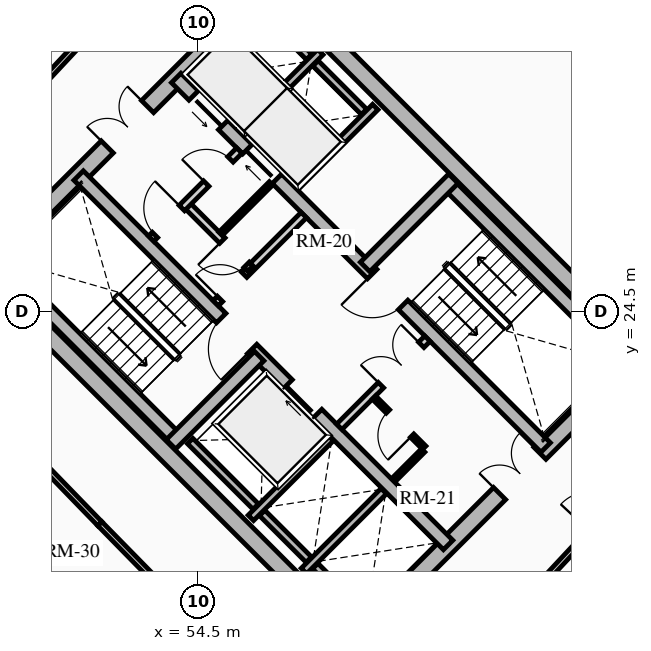
"""IFC4 building model, lengths in metres.
Left out: names, types, materials, properties, quantities, classifications, styles, units other than length and angle.
Written with IfcOpenShell. Run it as: python <this file> out.ifc"""

import sys

from ifc_helpers import new_model, si_unit, direction, frame, frame_2d, origin, place, context, subcontext, project, spatial, rectangle, extrude, source, transform, mapped, element, fill, save


model = new_model("IFC4")
c1 = context("Model", 3, precision=1e-05, world=origin(), true_north=direction((0.0, 1.0)))
c2 = subcontext(c1, "Body", "Model", "MODEL_VIEW")
j1 = project(units=[si_unit("LENGTHUNIT", "METRE"), si_unit("PLANEANGLEUNIT", "RADIAN")], contexts=[c1])
p1 = place(None, origin())
s1 = spatial("IfcSite", under=j1, at=p1, CompositionType="ELEMENT")
p2 = place(p1, origin())
s2 = spatial("IfcBuilding", under=s1, at=p2, CompositionType="ELEMENT")
p3 = place(p2, frame((0.0, 0.0, 107.98)))
s3 = spatial("IfcBuildingStorey", under=s2, at=p3, CompositionType="ELEMENT", Elevation=107.98)
for number, where, z_axis, x_axis in (
    (1, (58.737, 15.697, 0.0), (0.0, 0.0, 1.0), (-0.707, 0.707, 0.0)),
    (2, (66.303, 23.263, 0.0), (0.0, 0.0, 1.0), (-0.707, 0.707, 0.0)),
):
    element("IfcWall", number, at=place(p3, frame(where, z_axis=z_axis, x_axis=x_axis)), inside=s3, PredefinedType="SHEAR", context=c2, shape_type="SweptSolid", body=[
        extrude(rectangle(XDim=14.2, YDim=0.45, at=frame_2d((7.1, 0.0))), origin(), (0.0, 0.0, 1.0), 2.91),
    ])
p4 = place(p3, frame((58.578, 15.856, 0.0), z_axis=(0.0, 0.0, 1.0), x_axis=(0.707106781187, 0.707106781187, 0.0)))
e3 = element("IfcWall", 3, at=p4, inside=s3, PredefinedType="SHEAR", context=c2, shape_type="SweptSolid", body=[
    extrude(rectangle(XDim=10.7, YDim=0.45, at=frame_2d((5.35, 0.0))), origin(), (0.0, 0.0, 1.0), 2.91),
])
m1 = source(origin(), c2, "Body", "SweptSolid", [
    extrude(rectangle(XDim=1.5, YDim=2.02, at=frame_2d((0.75, 1.01))), frame((0.0, 0.235, 0.0), z_axis=(0.0, -1.0, 0.0), x_axis=(1.0, 0.0, 0.0)), (0.0, 0.0, 1.0), 0.47),
])
p5 = place(p4, frame((5.45, 0.0, 0.0)))
e4 = element("IfcOpeningElement", 4, at=p5, cuts=e3, PredefinedType="OPENING", context=c2, shape_type="MappedRepresentation", body=[
    mapped(m1, transform((0.0, 0.0, 0.0), x_axis=(1.0, 0.0, 0.0), y_axis=(0.0, 1.0, 0.0), z_axis=(0.0, 0.0, 1.0), scale=1.0)),
])
p6 = place(p3, frame((48.856, 25.578, 0.0), z_axis=(0.0, 0.0, 1.0), x_axis=(0.707106781187, 0.707106781187, 0.0)))
e5 = element("IfcWall", 5, at=p6, inside=s3, PredefinedType="SHEAR", context=c2, shape_type="SweptSolid", body=[
    extrude(rectangle(XDim=10.7, YDim=0.45, at=frame_2d((5.35, 0.0))), origin(), (0.0, 0.0, 1.0), 2.91),
])
p7 = place(p6, frame((4.6, 0.0, 0.0)))
e6 = element("IfcOpeningElement", 6, at=p7, cuts=e5, PredefinedType="OPENING", context=c2, shape_type="MappedRepresentation", body=[
    mapped(m1, transform((0.0, 0.0, 0.0), x_axis=(1.0, 0.0, 0.0), y_axis=(0.0, 1.0, 0.0), z_axis=(0.0, 0.0, 1.0), scale=1.0)),
])
p8 = place(p3, frame((61.078, 18.355, 0.0), z_axis=(0.0, 0.0, 1.0), x_axis=(-0.707106781187, 0.707106781187, 0.0)))
e7 = element("IfcWall", 7, at=p8, inside=s3, PredefinedType="SHEAR", context=c2, shape_type="SweptSolid", body=[
    extrude(rectangle(XDim=13.75, YDim=0.35, at=frame_2d((6.875, 0.0))), origin(), (0.0, 0.0, 1.0), 2.91),
])
m2 = source(origin(), c2, "Body", "SweptSolid", [
    extrude(rectangle(XDim=1.1, YDim=2.015, at=frame_2d((0.55, 1.007))), frame((0.0, 0.185, 0.0), z_axis=(0.0, -1.0, 0.0), x_axis=(1.0, 0.0, 0.0)), (0.0, 0.0, 1.0), 0.37),
])
p9 = place(p8, frame((4.875, 0.0, 0.0)))
e8 = element("IfcOpeningElement", 8, at=p9, cuts=e7, PredefinedType="OPENING", context=c2, shape_type="MappedRepresentation", body=[
    mapped(m2, transform((0.0, 0.0, 0.0), x_axis=(1.0, 0.0, 0.0), y_axis=(0.0, 1.0, 0.0), z_axis=(0.0, 0.0, 1.0), scale=1.0)),
])
m3 = source(origin(), c2, "Body", "SweptSolid", [
    extrude(rectangle(XDim=1.15, YDim=2.02, at=frame_2d((0.575, 1.01))), frame((0.0, 0.185, 0.0), z_axis=(0.0, -1.0, 0.0), x_axis=(1.0, 0.0, 0.0)), (0.0, 0.0, 1.0), 0.37),
])
p10 = place(p8, frame((7.295, 0.0, 0.0)))
e9 = element("IfcOpeningElement", 9, at=p10, cuts=e7, PredefinedType="OPENING", context=c2, shape_type="MappedRepresentation", body=[
    mapped(m3, transform((0.0, 0.0, 0.0), x_axis=(1.0, 0.0, 0.0), y_axis=(0.0, 1.0, 0.0), z_axis=(0.0, 0.0, 1.0), scale=1.0)),
])
p11 = place(p3, frame((63.645, 20.922, 0.0), z_axis=(0.0, 0.0, 1.0), x_axis=(-0.707106781187, 0.707106781187, 0.0)))
e10 = element("IfcWall", 10, at=p11, inside=s3, PredefinedType="SHEAR", context=c2, shape_type="SweptSolid", body=[
    extrude(rectangle(XDim=13.75, YDim=0.35, at=frame_2d((6.875, 0.0))), origin(), (0.0, 0.0, 1.0), 2.91),
])
p12 = place(p11, frame((10.0, 0.0, 0.0)))
e11 = element("IfcOpeningElement", 11, at=p12, cuts=e10, PredefinedType="OPENING", context=c2, shape_type="MappedRepresentation", body=[
    mapped(m2, transform((0.0, 0.0, 0.0), x_axis=(1.0, 0.0, 0.0), y_axis=(0.0, 1.0, 0.0), z_axis=(0.0, 0.0, 1.0), scale=1.0)),
])
p13 = place(p11, frame((12.0, 0.0, 0.0)))
e12 = element("IfcOpeningElement", 12, at=p13, cuts=e10, PredefinedType="OPENING", context=c2, shape_type="MappedRepresentation", body=[
    mapped(m2, transform((0.0, 0.0, 0.0), x_axis=(1.0, 0.0, 0.0), y_axis=(0.0, 1.0, 0.0), z_axis=(0.0, 0.0, 1.0), scale=1.0)),
])
p14 = place(p11, frame((5.305, 0.0, 0.0)))
e13 = element("IfcOpeningElement", 13, at=p14, cuts=e10, PredefinedType="OPENING", context=c2, shape_type="MappedRepresentation", body=[
    mapped(m3, transform((0.0, 0.0, 0.0), x_axis=(1.0, 0.0, 0.0), y_axis=(0.0, 1.0, 0.0), z_axis=(0.0, 0.0, 1.0), scale=1.0)),
])
p15 = place(p3, frame((53.922, 21.141, 0.0), z_axis=(0.0, 0.0, 1.0), x_axis=(-0.707088616009, 0.707124945897, 0.0)))
e14 = element("IfcWall", 14, at=p15, inside=s3, PredefinedType="SHEAR", context=c2, shape_type="SweptSolid", body=[
    extrude(rectangle(XDim=6.72, YDim=0.35, at=frame_2d((3.36, 0.0))), origin(), (0.0, 0.0, 1.0), 2.91),
])
p16 = place(p3, frame((53.784, 21.003, 0.0), z_axis=(0.0, 0.0, 1.0), x_axis=(0.707106781187, 0.707106781187, 0.0)))
e15 = element("IfcWall", 15, at=p16, inside=s3, PredefinedType="SHEAR", context=c2, shape_type="SweptSolid", body=[
    extrude(rectangle(XDim=3.285, YDim=0.35, at=frame_2d((1.643, 0.0))), origin(), (0.0, 0.0, 1.0), 2.91),
])
p17 = place(p3, frame((65.83, 23.107, 0.0), z_axis=(0.0, 0.0, 1.0), x_axis=(-0.707088616009, 0.707124945897, 0.0)))
e16 = element("IfcWall", 16, at=p17, inside=s3, PredefinedType="SHEAR", context=c2, shape_type="SweptSolid", body=[
    extrude(rectangle(XDim=6.72, YDim=0.35, at=frame_2d((3.36, 0.0))), origin(), (0.0, 0.0, 1.0), 2.91),
])
p18 = place(p3, frame((58.893, 25.674, 0.0), z_axis=(0.0, 0.0, 1.0), x_axis=(0.707106781187, 0.707106781187, 0.0)))
e17 = element("IfcWall", 17, at=p18, inside=s3, PredefinedType="SHEAR", context=c2, shape_type="SweptSolid", body=[
    extrude(rectangle(XDim=3.285, YDim=0.35, at=frame_2d((1.643, 0.0))), origin(), (0.0, 0.0, 1.0), 2.91),
])
p19 = place(p3, frame((55.888, 19.069, 0.0), z_axis=(0.0, 0.0, 1.0), x_axis=(0.707106781187, 0.707106781187, 0.0)))
e18 = element("IfcWall", 18, at=p19, inside=s3, PredefinedType="SHEAR", context=c2, shape_type="SweptSolid", body=[
    extrude(rectangle(XDim=2.97, YDim=0.2, at=frame_2d((1.485, 0.0))), origin(), (0.0, 0.0, 1.0), 2.91),
])
p20 = place(p3, frame((56.015, 19.366, 0.0), z_axis=(0.0, 0.0, 1.0), x_axis=(-0.707106781187, 0.707106781187, 0.0)))
e19 = element("IfcWall", 19, at=p20, inside=s3, PredefinedType="SHEAR", context=c2, shape_type="SweptSolid", body=[
    extrude(rectangle(XDim=2.44, YDim=0.2, at=frame_2d((1.22, 0.0))), origin(), (0.0, 0.0, 1.0), 2.91),
])
p21 = place(p3, frame((57.284, 17.673, 0.0), z_axis=(0.0, 0.0, 1.0), x_axis=(0.707147878904, 0.70706568108, 0.0)))
e20 = element("IfcWall", 20, at=p21, inside=s3, PredefinedType="SHEAR", context=c2, shape_type="SweptSolid", body=[
    extrude(rectangle(XDim=2.97, YDim=0.2, at=frame_2d((1.485, 0.0))), origin(), (0.0, 0.0, 1.0), 2.91),
])
p22 = place(p3, frame((57.412, 17.97, 0.0), z_axis=(0.0, 0.0, 1.0), x_axis=(-0.707106781187, 0.707106781187, 0.0)))
e21 = element("IfcWall", 21, at=p22, inside=s3, PredefinedType="SHEAR", context=c2, shape_type="SweptSolid", body=[
    extrude(rectangle(XDim=1.735, YDim=0.2, at=frame_2d((0.867, 0.0))), origin(), (0.0, 0.0, 1.0), 2.91),
])
p23 = place(p3, frame((58.737, 16.644, 0.0), z_axis=(0.0, 0.0, 1.0), x_axis=(-0.707032117043, 0.707181437447, 0.0)))
e22 = element("IfcWall", 22, at=p23, inside=s3, PredefinedType="SHEAR", context=c2, shape_type="SweptSolid", body=[
    extrude(rectangle(XDim=1.635, YDim=0.2, at=frame_2d((0.817, 0.0))), origin(), (0.0, 0.0, 1.0), 2.91),
])
p24 = place(p3, frame((57.062, 27.781, 0.0), z_axis=(0.0, 0.0, 1.0), x_axis=(0.707106781187, 0.707106781187, 0.0)))
e23 = element("IfcWall", 23, at=p24, inside=s3, PredefinedType="SHEAR", context=c2, shape_type="SweptSolid", body=[
    extrude(rectangle(XDim=2.97, YDim=0.2, at=frame_2d((1.485, 0.0))), origin(), (0.0, 0.0, 1.0), 2.91),
])
p25 = place(p3, frame((55.615, 29.227, 0.0), z_axis=(0.0, 0.0, 1.0), x_axis=(0.707147878904, 0.70706568108, 0.0)))
e24 = element("IfcWall", 24, at=p25, inside=s3, PredefinedType="SHEAR", context=c2, shape_type="SweptSolid", body=[
    extrude(rectangle(XDim=2.97, YDim=0.2, at=frame_2d((1.485, 0.0))), origin(), (0.0, 0.0, 1.0), 2.91),
])
p26 = place(p3, frame((58.865, 29.754, 0.0), z_axis=(0.0, 0.0, 1.0), x_axis=(-0.707174411312, 0.707039144592, 0.0)))
e25 = element("IfcWall", 25, at=p26, inside=s3, PredefinedType="SHEAR", context=c2, shape_type="SweptSolid", body=[
    extrude(rectangle(XDim=1.805, YDim=0.2, at=frame_2d((0.902, 0.0))), origin(), (0.0, 0.0, 1.0), 2.91),
])
p27 = place(p3, frame((57.419, 31.2, 0.0), z_axis=(0.0, 0.0, 1.0), x_axis=(-0.707032117043, 0.707181437447, 0.0)))
e26 = element("IfcWall", 26, at=p27, inside=s3, PredefinedType="SHEAR", context=c2, shape_type="SweptSolid", body=[
    extrude(rectangle(XDim=1.635, YDim=0.2, at=frame_2d((0.817, 0.0))), origin(), (0.0, 0.0, 1.0), 2.91),
])
p28 = place(p3, frame((58.214, 21.467, 0.0), z_axis=(0.0, 0.0, 1.0), x_axis=(0.707106781187, 0.707106781187, 0.0)))
e27 = element("IfcWall", 27, at=p28, inside=s3, PredefinedType="PARTITIONING", context=c2, shape_type="SweptSolid", body=[
    extrude(rectangle(XDim=3.28, YDim=0.2, at=frame_2d((1.64, 0.0))), origin(), (0.0, 0.0, 1.0), 2.655),
])
m4 = source(origin(), c2, "Body", "SweptSolid", [
    extrude(rectangle(XDim=1.5, YDim=2.02, at=frame_2d((0.75, 1.01))), frame((0.0, 0.11, 0.0), z_axis=(0.0, -1.0, 0.0), x_axis=(1.0, 0.0, 0.0)), (0.0, 0.0, 1.0), 0.22),
])
p29 = place(p28, frame((1.55, 0.0, 0.0)))
e28 = element("IfcOpeningElement", 28, at=p29, cuts=e27, PredefinedType="OPENING", context=c2, shape_type="MappedRepresentation", body=[
    mapped(m4, transform((0.0, 0.0, 0.0), x_axis=(1.0, 0.0, 0.0), y_axis=(0.0, 1.0, 0.0), z_axis=(0.0, 0.0, 1.0), scale=1.0)),
])
p30 = place(p3, frame((54.961, 24.719, 0.0), z_axis=(0.0, 0.0, 1.0), x_axis=(0.707106781187, 0.707106781187, 0.0)))
e29 = element("IfcWall", 29, at=p30, inside=s3, PredefinedType="PARTITIONING", context=c2, shape_type="SweptSolid", body=[
    extrude(rectangle(XDim=3.28, YDim=0.2, at=frame_2d((1.64, 0.0))), origin(), (0.0, 0.0, 1.0), 2.655),
])
m5 = source(origin(), c2, "Body", "SweptSolid", [
    extrude(rectangle(XDim=0.9, YDim=2.005, at=frame_2d((0.45, 1.002))), frame((0.0, 0.11, 0.0), z_axis=(0.0, -1.0, 0.0), x_axis=(1.0, 0.0, 0.0)), (0.0, 0.0, 1.0), 0.22),
])
p31 = place(p30, frame((0.16, 0.0, 0.0)))
e30 = element("IfcOpeningElement", 30, at=p31, cuts=e29, PredefinedType="OPENING", context=c2, shape_type="MappedRepresentation", body=[
    mapped(m5, transform((0.0, 0.0, 0.0), x_axis=(1.0, 0.0, 0.0), y_axis=(0.0, 1.0, 0.0), z_axis=(0.0, 0.0, 1.0), scale=1.0)),
])
p32 = place(p3, frame((55.874, 25.631, 0.0), z_axis=(0.0, 0.0, 1.0), x_axis=(-0.707157639372, 0.707055919343, 0.0)))
e31 = element("IfcWall", 31, at=p32, inside=s3, PredefinedType="PARTITIONING", context=c2, shape_type="SweptSolid", body=[
    extrude(rectangle(XDim=2.4, YDim=0.2, at=frame_2d((1.2, 0.0))), origin(), (0.0, 0.0, 1.0), 2.655),
])
p33 = place(p32, frame((0.14, 0.0, 0.0)))
e32 = element("IfcOpeningElement", 32, at=p33, cuts=e31, PredefinedType="OPENING", context=c2, shape_type="MappedRepresentation", body=[
    mapped(m5, transform((0.0, 0.0, 0.0), x_axis=(1.0, 0.0, 0.0), y_axis=(0.0, 1.0, 0.0), z_axis=(0.0, 0.0, 1.0), scale=1.0)),
])
p34 = place(p3, frame((53.264, 26.416, 0.0), z_axis=(0.0, 0.0, 1.0), x_axis=(0.707106781187, 0.707106781187, 0.0)))
e33 = element("IfcWall", 33, at=p34, inside=s3, PredefinedType="PARTITIONING", context=c2, shape_type="SweptSolid", body=[
    extrude(rectangle(XDim=3.28, YDim=0.2, at=frame_2d((1.64, 0.0))), origin(), (0.0, 0.0, 1.0), 2.655),
])
m6 = source(origin(), c2, "Body", "SweptSolid", [
    extrude(rectangle(XDim=1.0, YDim=2.015, at=frame_2d((0.5, 1.007))), frame((0.0, 0.11, 0.0), z_axis=(0.0, -1.0, 0.0), x_axis=(1.0, 0.0, 0.0)), (0.0, 0.0, 1.0), 0.22),
])
p35 = place(p34, frame((0.14, 0.0, 0.0)))
e34 = element("IfcOpeningElement", 34, at=p35, cuts=e33, PredefinedType="OPENING", context=c2, shape_type="MappedRepresentation", body=[
    mapped(m6, transform((0.0, 0.0, 0.0), x_axis=(1.0, 0.0, 0.0), y_axis=(0.0, 1.0, 0.0), z_axis=(0.0, 0.0, 1.0), scale=1.0)),
])
p36 = place(p34, frame((2.05, 0.0, 0.0)))
e35 = element("IfcOpeningElement", 35, at=p36, cuts=e33, PredefinedType="OPENING", context=c2, shape_type="MappedRepresentation", body=[
    mapped(m5, transform((0.0, 0.0, 0.0), x_axis=(1.0, 0.0, 0.0), y_axis=(0.0, 1.0, 0.0), z_axis=(0.0, 0.0, 1.0), scale=1.0)),
])
p37 = place(p3, frame((60.448, 20.915, 0.0), z_axis=(0.0, 0.0, 1.0), x_axis=(-0.707106781187, 0.707106781187, 0.0)))
e36 = element("IfcWall", 36, at=p37, inside=s3, PredefinedType="PARTITIONING", context=c2, shape_type="SweptSolid", body=[
    extrude(rectangle(XDim=1.87, YDim=0.125, at=frame_2d((0.935, 0.0))), origin(), (0.0, 0.0, 1.0), 2.655),
])
m7 = source(origin(), c2, "Body", "SweptSolid", [
    extrude(rectangle(XDim=0.9, YDim=2.005, at=frame_2d((0.45, 1.002))), frame((0.0, 0.073, 0.0), z_axis=(0.0, -1.0, 0.0), x_axis=(1.0, 0.0, 0.0)), (0.0, 0.0, 1.0), 0.145),
])
p38 = place(p37, frame((0.45, 0.0, 0.0)))
e37 = element("IfcOpeningElement", 37, at=p38, cuts=e36, PredefinedType="OPENING", context=c2, shape_type="MappedRepresentation", body=[
    mapped(m7, transform((0.0, 0.0, 0.0), x_axis=(1.0, 0.0, 0.0), y_axis=(0.0, 1.0, 0.0), z_axis=(0.0, 0.0, 1.0), scale=1.0)),
])
p39 = place(p3, frame((59.643, 20.066, 0.0), z_axis=(0.0, 0.0, 1.0), x_axis=(0.707106781187, 0.707106781187, 0.0)))
e38 = element("IfcWall", 38, at=p39, inside=s3, PredefinedType="PARTITIONING", context=c2, shape_type="SweptSolid", body=[
    extrude(rectangle(XDim=1.1, YDim=0.125, at=frame_2d((0.55, 0.0))), origin(), (0.0, 0.0, 1.0), 2.655),
])
p40 = place(p3, frame((55.089, 26.543, 0.0), z_axis=(0.0, 0.0, 1.0), x_axis=(0.707106781187, 0.707106781187, 0.0)))
e39 = element("IfcWall", 39, at=p40, inside=s3, PredefinedType="PARTITIONING", context=c2, shape_type="SweptSolid", body=[
    extrude(rectangle(XDim=1.88, YDim=0.125, at=frame_2d((0.94, 0.0))), origin(), (0.0, 0.0, 1.0), 2.655),
])
p41 = place(p3, frame((52.043, 32.28, 0.0), z_axis=(0.0, 0.0, 1.0), x_axis=(-0.682606081633, -0.730786519661, 0.0)))
e40 = element("IfcWall", 40, at=p41, inside=s3, PredefinedType="PARTITIONING", context=c2, shape_type="SweptSolid", body=[
    extrude(rectangle(XDim=6.527, YDim=0.15, at=frame_2d((3.263, 0.0))), origin(), (0.0, 0.0, 1.0), 2.225),
])
p42 = place(p3, frame((47.706, 23.253, 0.0), z_axis=(0.0, 0.0, 1.0), x_axis=(0.696179266346, -0.717867974707, 0.0)))
e41 = element("IfcWall", 41, at=p42, inside=s3, PredefinedType="PARTITIONING", context=c2, shape_type="SweptSolid", body=[
    extrude(rectangle(XDim=6.045, YDim=0.15, at=frame_2d((3.022, 0.0))), origin(), (0.0, 0.0, 1.0), 2.655),
])
p43 = place(p3, frame((51.914, 18.914, 0.0), z_axis=(0.0, 0.0, 1.0), x_axis=(0.699999313799, -0.714143515465, 0.0)))
e42 = element("IfcWall", 42, at=p43, inside=s3, PredefinedType="PARTITIONING", context=c2, shape_type="SweptSolid", body=[
    extrude(rectangle(XDim=6.162, YDim=0.15, at=frame_2d((3.081, 0.0))), origin(), (0.0, 0.0, 1.0), 2.225),
])
p44 = place(p3, frame((62.903, 16.667, 0.0), z_axis=(0.0, 0.0, 1.0), x_axis=(0.682371947497, 0.731005147225, 0.0)))
e43 = element("IfcWall", 43, at=p44, inside=s3, PredefinedType="PARTITIONING", context=c2, shape_type="SweptSolid", body=[
    extrude(rectangle(XDim=6.642, YDim=0.15, at=frame_2d((3.321, 0.0))), origin(), (0.0, 0.0, 1.0), 2.225),
])
m8 = source(origin(), c2, "Body", "SweptSolid", [
    extrude(rectangle(XDim=1.05, YDim=2.015, at=frame_2d((0.525, 1.007))), frame((0.0, 0.085, 0.0), z_axis=(0.0, -1.0, 0.0), x_axis=(1.0, 0.0, 0.0)), (0.0, 0.0, 1.0), 0.17),
])
p45 = place(p44, frame((2.796, 0.0, 0.0)))
e44 = element("IfcOpeningElement", 44, at=p45, cuts=e43, PredefinedType="OPENING", context=c2, shape_type="MappedRepresentation", body=[
    mapped(m8, transform((0.0, 0.0, 0.0), x_axis=(1.0, 0.0, 0.0), y_axis=(0.0, 1.0, 0.0), z_axis=(0.0, 0.0, 1.0), scale=1.0)),
])
m9 = source(origin(), c2, "Body", "SweptSolid", [
    extrude(rectangle(XDim=1.1, YDim=2.015, at=frame_2d((0.55, 1.007))), frame((0.0, 0.025, 0.0), z_axis=(0.0, -1.0, 0.0), x_axis=(1.0, 0.0, 0.0)), (0.0, 0.0, 1.0), 0.05),
])
p46 = place(p9, origin())
e45 = element("IfcDoor", 45, at=p46, inside=s3, OperationType="SLIDING_TO_RIGHT", PredefinedType="DOOR", context=c2, shape_type="MappedRepresentation", body=[
    mapped(m9, transform((0.0, 0.0, 0.0), x_axis=(1.0, 0.0, 0.0), y_axis=(0.0, 1.0, 0.0), z_axis=(0.0, 0.0, 1.0), scale=1.0)),
])
fill(e8, e45)
p47 = place(p12, origin())
e46 = element("IfcDoor", 46, at=p47, inside=s3, OperationType="SLIDING_TO_RIGHT", PredefinedType="DOOR", context=c2, shape_type="MappedRepresentation", body=[
    mapped(m9, transform((0.0, 0.0, 0.0), x_axis=(1.0, 0.0, 0.0), y_axis=(0.0, 1.0, 0.0), z_axis=(0.0, 0.0, 1.0), scale=1.0)),
])
fill(e11, e46)
p48 = place(p13, origin())
e47 = element("IfcDoor", 47, at=p48, inside=s3, OperationType="SLIDING_TO_LEFT", PredefinedType="DOOR", context=c2, shape_type="MappedRepresentation", body=[
    mapped(m9, transform((0.0, 0.0, 0.0), x_axis=(1.0, 0.0, 0.0), y_axis=(0.0, 1.0, 0.0), z_axis=(0.0, 0.0, 1.0), scale=1.0)),
])
fill(e12, e47)
m10 = source(origin(), c2, "Body", "SweptSolid", [
    extrude(rectangle(XDim=1.15, YDim=2.02, at=frame_2d((0.575, 1.01))), frame((0.0, 0.025, 0.0), z_axis=(0.0, -1.0, 0.0), x_axis=(1.0, 0.0, 0.0)), (0.0, 0.0, 1.0), 0.05),
])
p49 = place(p10, origin())
e48 = element("IfcDoor", 48, at=p49, inside=s3, OperationType="SINGLE_SWING_LEFT", PredefinedType="DOOR", context=c2, shape_type="MappedRepresentation", body=[
    mapped(m10, transform((0.0, 0.0, 0.0), x_axis=(1.0, 0.0, 0.0), y_axis=(0.0, 1.0, 0.0), z_axis=(0.0, 0.0, 1.0), scale=1.0)),
])
fill(e9, e48)
p50 = place(p14, origin())
e49 = element("IfcDoor", 49, at=p50, inside=s3, OperationType="SINGLE_SWING_RIGHT", PredefinedType="DOOR", context=c2, shape_type="MappedRepresentation", body=[
    mapped(m10, transform((0.0, 0.0, 0.0), x_axis=(1.0, 0.0, 0.0), y_axis=(0.0, 1.0, 0.0), z_axis=(0.0, 0.0, 1.0), scale=1.0)),
])
fill(e13, e49)
m11 = source(origin(), c2, "Body", "SweptSolid", [
    extrude(rectangle(XDim=1.5, YDim=2.02, at=frame_2d((0.75, 1.01))), frame((0.0, 0.025, 0.0), z_axis=(0.0, -1.0, 0.0), x_axis=(1.0, 0.0, 0.0)), (0.0, 0.0, 1.0), 0.05),
])
p51 = place(p7, origin())
e50 = element("IfcDoor", 50, at=p51, inside=s3, OperationType="DOUBLE_DOOR_SINGLE_SWING", PredefinedType="DOOR", context=c2, shape_type="MappedRepresentation", body=[
    mapped(m11, transform((0.0, 0.0, 0.0), x_axis=(1.0, 0.0, 0.0), y_axis=(0.0, 1.0, 0.0), z_axis=(0.0, 0.0, 1.0), scale=1.0)),
])
fill(e6, e50)
p52 = place(p5, origin())
e51 = element("IfcDoor", 51, at=p52, inside=s3, OperationType="DOUBLE_DOOR_SINGLE_SWING", PredefinedType="DOOR", context=c2, shape_type="MappedRepresentation", body=[
    mapped(m11, transform((0.0, 0.0, 0.0), x_axis=(1.0, 0.0, 0.0), y_axis=(0.0, 1.0, 0.0), z_axis=(0.0, 0.0, 1.0), scale=1.0)),
])
fill(e4, e51)
p53 = place(p29, origin())
e52 = element("IfcDoor", 52, at=p53, inside=s3, OperationType="DOUBLE_DOOR_SINGLE_SWING", PredefinedType="DOOR", context=c2, shape_type="MappedRepresentation", body=[
    mapped(m11, transform((0.0, 0.0, 0.0), x_axis=(1.0, 0.0, 0.0), y_axis=(0.0, 1.0, 0.0), z_axis=(0.0, 0.0, 1.0), scale=1.0)),
])
fill(e28, e52)
m12 = source(origin(), c2, "Body", "SweptSolid", [
    extrude(rectangle(XDim=0.9, YDim=2.005, at=frame_2d((0.45, 1.002))), frame((0.0, 0.025, 0.0), z_axis=(0.0, -1.0, 0.0), x_axis=(1.0, 0.0, 0.0)), (0.0, 0.0, 1.0), 0.05),
])
p54 = place(p31, origin())
e53 = element("IfcDoor", 53, at=p54, inside=s3, OperationType="SINGLE_SWING_LEFT", PredefinedType="DOOR", context=c2, shape_type="MappedRepresentation", body=[
    mapped(m12, transform((0.0, 0.0, 0.0), x_axis=(1.0, 0.0, 0.0), y_axis=(0.0, 1.0, 0.0), z_axis=(0.0, 0.0, 1.0), scale=1.0)),
])
fill(e30, e53)
m13 = source(origin(), c2, "Body", "SweptSolid", [
    extrude(rectangle(XDim=1.0, YDim=2.015, at=frame_2d((0.5, 1.007))), frame((0.0, 0.025, 0.0), z_axis=(0.0, -1.0, 0.0), x_axis=(1.0, 0.0, 0.0)), (0.0, 0.0, 1.0), 0.05),
])
p55 = place(p35, origin())
e54 = element("IfcDoor", 54, at=p55, inside=s3, OperationType="SINGLE_SWING_RIGHT", PredefinedType="DOOR", context=c2, shape_type="MappedRepresentation", body=[
    mapped(m13, transform((0.0, 0.0, 0.0), x_axis=(1.0, 0.0, 0.0), y_axis=(0.0, 1.0, 0.0), z_axis=(0.0, 0.0, 1.0), scale=1.0)),
])
fill(e34, e54)
p56 = place(p38, origin())
e55 = element("IfcDoor", 55, at=p56, inside=s3, OperationType="SINGLE_SWING_LEFT", PredefinedType="DOOR", context=c2, shape_type="MappedRepresentation", body=[
    mapped(m12, transform((0.0, 0.0, 0.0), x_axis=(1.0, 0.0, 0.0), y_axis=(0.0, 1.0, 0.0), z_axis=(0.0, 0.0, 1.0), scale=1.0)),
])
fill(e37, e55)
p57 = place(p33, origin())
e56 = element("IfcDoor", 56, at=p57, inside=s3, OperationType="SINGLE_SWING_RIGHT", PredefinedType="DOOR", context=c2, shape_type="MappedRepresentation", body=[
    mapped(m12, transform((0.0, 0.0, 0.0), x_axis=(1.0, 0.0, 0.0), y_axis=(0.0, 1.0, 0.0), z_axis=(0.0, 0.0, 1.0), scale=1.0)),
])
fill(e32, e56)
p58 = place(p36, origin())
e57 = element("IfcDoor", 57, at=p58, inside=s3, OperationType="SINGLE_SWING_LEFT", PredefinedType="DOOR", context=c2, shape_type="MappedRepresentation", body=[
    mapped(m12, transform((0.0, 0.0, 0.0), x_axis=(1.0, 0.0, 0.0), y_axis=(0.0, 1.0, 0.0), z_axis=(0.0, 0.0, 1.0), scale=1.0)),
])
fill(e35, e57)
save(model, sys.argv[1])
